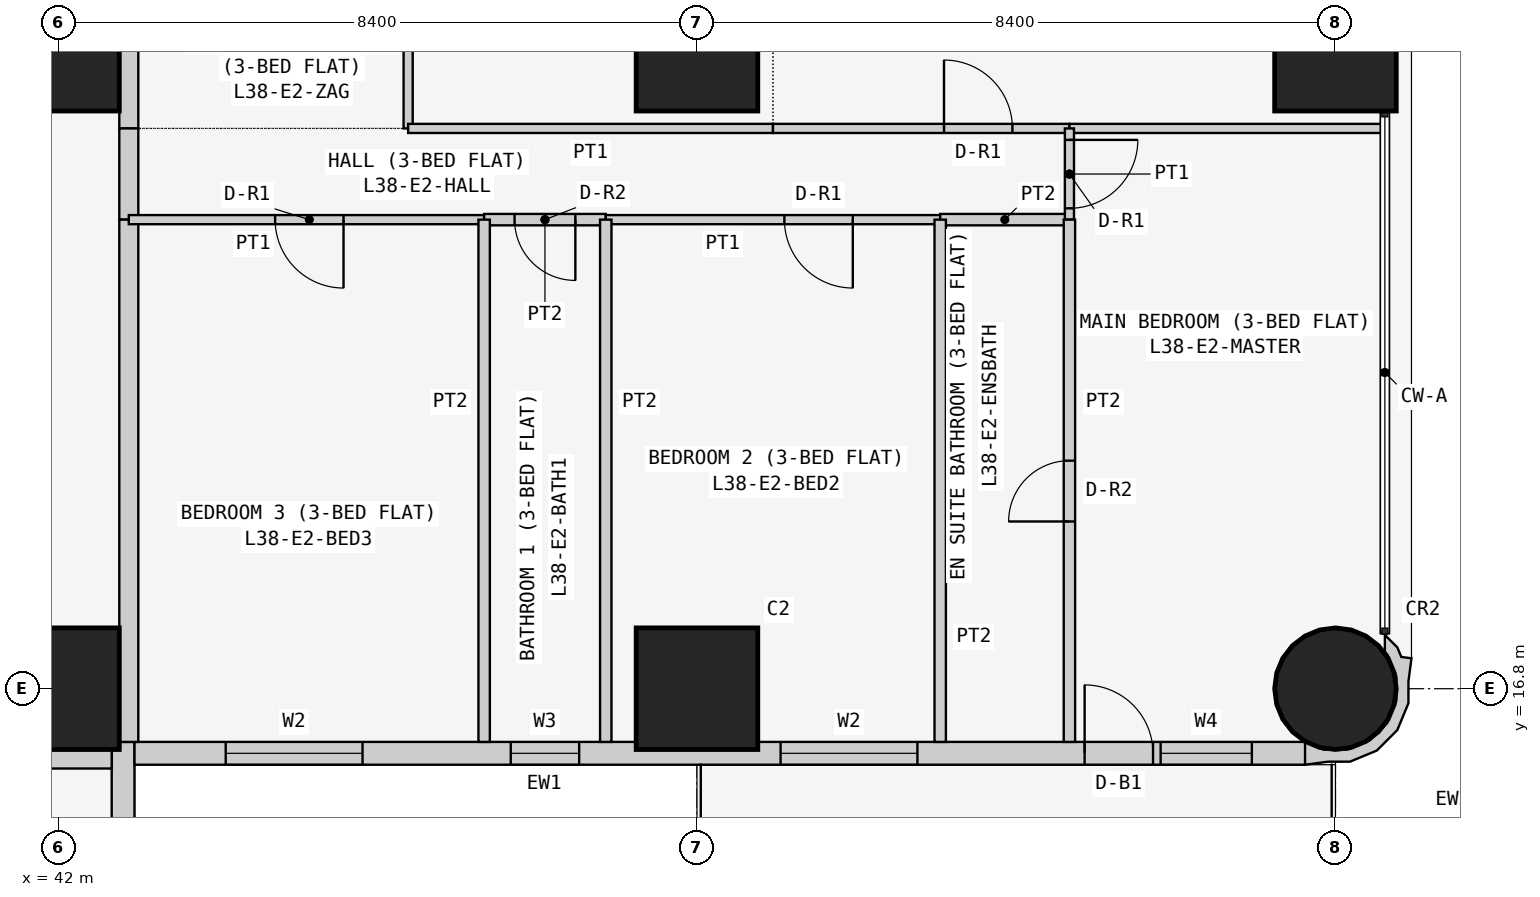
"""IFC4 building model, lengths in metres.
Left out: names, types, materials, properties, quantities, classifications, styles, units other than length and angle.
Written with IfcOpenShell. Run it as: python <this file> out.ifc"""

import sys

from ifc_helpers import new_model, si_unit, direction, frame, frame_2d, origin, origin_2d, place, context, subcontext, project, spatial, polyline, rectangle, circle, outline, extrude, element, fill, save


model = new_model("IFC4")
c1 = context("Model", 3, precision=1e-05, world=origin(), true_north=direction((0.0, 1.0)))
c2 = subcontext(c1, "Body", "Model", "MODEL_VIEW")
j1 = project(units=[si_unit("LENGTHUNIT", "METRE"), si_unit("PLANEANGLEUNIT", "RADIAN")], contexts=[c1])
p1 = place(None, origin())
s1 = spatial("IfcSite", under=j1, at=p1, CompositionType="ELEMENT")
p2 = place(p1, origin())
s2 = spatial("IfcBuilding", under=s1, at=p2, CompositionType="ELEMENT")
p3 = place(p2, frame((0.0, 0.0, 148.5)))
s3 = spatial("IfcBuildingStorey", under=s2, at=p3, CompositionType="ELEMENT", Elevation=148.5)
for number, where, z_axis, x_axis in (
    (1, (42.0, 16.8, 0.0), (0.0, 0.0, 1.0), (1.0, 0.0, 0.0)),
    (2, (42.0, 25.2, 0.0), (0.0, 0.0, 1.0), (1.0, 0.0, 0.0)),
    (3, (50.4, 16.8, 0.0), (0.0, 0.0, 1.0), (1.0, 0.0, 0.0)),
    (4, (50.4, 25.2, 0.0), (0.0, 0.0, 1.0), (1.0, 0.0, 0.0)),
):
    element("IfcColumn", number, at=place(p3, frame(where, z_axis=z_axis, x_axis=x_axis)), inside=s3, PredefinedType="COLUMN", context=c2, shape_type="SweptSolid", body=[
        extrude(rectangle(XDim=1.6, YDim=1.6, at=origin_2d()), origin(), (0.0, 0.0, 1.0), 3.6),
    ])
p4 = place(p3, frame((58.8, 16.8, 0.0), z_axis=(0.0, 0.0, 1.0), x_axis=(1.0, 0.0, 0.0)))
e5 = element("IfcColumn", 5, at=p4, inside=s3, PredefinedType="COLUMN", context=c2, shape_type="SweptSolid", body=[
    extrude(circle(Radius=0.8, at=origin_2d()), origin(), (0.0, 0.0, 1.0), 3.6),
])
p5 = place(p3, frame((58.8, 25.2, 0.0), z_axis=(0.0, 0.0, 1.0), x_axis=(1.0, 0.0, 0.0)))
e6 = element("IfcColumn", 6, at=p5, inside=s3, PredefinedType="COLUMN", context=c2, shape_type="SweptSolid", body=[
    extrude(rectangle(XDim=1.6, YDim=1.6, at=origin_2d()), origin(), (0.0, 0.0, 1.0), 3.6),
])
p6 = place(p3, frame((42.85, 8.8, 0.0), z_axis=(0.0, 0.0, 1.0), x_axis=(0.0, 1.0, 0.0)))
e7 = element("IfcWall", 7, at=p6, inside=s3, PredefinedType="SOLIDWALL", context=c2, shape_type="SweptSolid", body=[
    extrude(rectangle(XDim=7.3, YDim=0.3, at=frame_2d((3.65, 0.0))), origin(), (0.0, 0.0, 1.0), 3.45),
])
p7 = place(p6, frame((3.1, 0.0, 0.9)))
e8 = element("IfcOpeningElement", 8, at=p7, cuts=e7, PredefinedType="OPENING", context=c2, shape_type="SweptSolid", body=[
    extrude(rectangle(XDim=2.4, YDim=1.5, at=frame_2d((1.2, 0.75))), frame((0.0, 0.16, 0.0), z_axis=(0.0, -1.0, 0.0), x_axis=(1.0, 0.0, 0.0)), (0.0, 0.0, 1.0), 0.32),
])
p8 = place(p6, frame((0.75, 0.0, 0.9)))
e9 = element("IfcOpeningElement", 9, at=p8, cuts=e7, PredefinedType="OPENING", context=c2, shape_type="SweptSolid", body=[
    extrude(rectangle(XDim=1.2, YDim=1.5, at=frame_2d((0.6, 0.75))), frame((0.0, 0.16, 0.0), z_axis=(0.0, -1.0, 0.0), x_axis=(1.0, 0.0, 0.0)), (0.0, 0.0, 1.0), 0.32),
])
p9 = place(p3, frame((43.0, 15.95, 0.0), z_axis=(0.0, 0.0, 1.0), x_axis=(1.0, 0.0, 0.0)))
e10 = element("IfcWall", 10, at=p9, inside=s3, PredefinedType="SOLIDWALL", context=c2, shape_type="SweptSolid", body=[
    extrude(rectangle(XDim=15.4, YDim=0.3, at=frame_2d((7.7, 0.0))), origin(), (0.0, 0.0, 1.0), 3.45),
])
p10 = place(p9, frame((1.2, 0.0, 0.9)))
e11 = element("IfcOpeningElement", 11, at=p10, cuts=e10, PredefinedType="OPENING", context=c2, shape_type="SweptSolid", body=[
    extrude(rectangle(XDim=1.8, YDim=1.5, at=frame_2d((0.9, 0.75))), frame((0.0, 0.16, 0.0), z_axis=(0.0, -1.0, 0.0), x_axis=(1.0, 0.0, 0.0)), (0.0, 0.0, 1.0), 0.32),
])
p11 = place(p9, frame((4.95, 0.0, 1.5)))
e12 = element("IfcOpeningElement", 12, at=p11, cuts=e10, PredefinedType="OPENING", context=c2, shape_type="SweptSolid", body=[
    extrude(rectangle(XDim=0.9, YDim=0.7, at=frame_2d((0.45, 0.35))), frame((0.0, 0.16, 0.0), z_axis=(0.0, -1.0, 0.0), x_axis=(1.0, 0.0, 0.0)), (0.0, 0.0, 1.0), 0.32),
])
p12 = place(p9, frame((8.5, 0.0, 0.9)))
e13 = element("IfcOpeningElement", 13, at=p12, cuts=e10, PredefinedType="OPENING", context=c2, shape_type="SweptSolid", body=[
    extrude(rectangle(XDim=1.8, YDim=1.5, at=frame_2d((0.9, 0.75))), frame((0.0, 0.16, 0.0), z_axis=(0.0, -1.0, 0.0), x_axis=(1.0, 0.0, 0.0)), (0.0, 0.0, 1.0), 0.32),
])
p13 = place(p9, frame((12.5, 0.0, 0.0)))
e14 = element("IfcOpeningElement", 14, at=p13, cuts=e10, PredefinedType="OPENING", context=c2, shape_type="SweptSolid", body=[
    extrude(rectangle(XDim=0.9, YDim=2.4, at=frame_2d((0.45, 1.2))), frame((0.0, 0.16, 0.0), z_axis=(0.0, -1.0, 0.0), x_axis=(1.0, 0.0, 0.0)), (0.0, 0.0, 1.0), 0.32),
])
p14 = place(p9, frame((13.5, 0.0, 0.9)))
e15 = element("IfcOpeningElement", 15, at=p14, cuts=e10, PredefinedType="OPENING", context=c2, shape_type="SweptSolid", body=[
    extrude(rectangle(XDim=1.2, YDim=1.5, at=frame_2d((0.6, 0.75))), frame((0.0, 0.16, 0.0), z_axis=(0.0, -1.0, 0.0), x_axis=(1.0, 0.0, 0.0)), (0.0, 0.0, 1.0), 0.32),
])
p15 = place(p3, frame((58.473, 15.983, 0.0), z_axis=(0.0, 0.0, 1.0), x_axis=(0.93923434088, -0.343276641956, 0.0)))
e16 = element("IfcWall", 16, at=p15, inside=s3, PredefinedType="SOLIDWALL", context=c2, shape_type="SweptSolid", body=[
    extrude(outline(polyline([(0.828, 1.599), (0.697, 1.569), (0.604, 1.67), (0.394, 1.767), (0.471, 1.556), (0.508, 1.539), (0.724, 1.304), (0.834, 1.005), (0.82, 0.686), (0.686, 0.397), (0.451, 0.182), (0.152, 0.073), (-0.116, 0.084), (-0.127, 0.078), (-0.146, 0.071), (-0.006, -0.197), (0.266, -0.055), (0.535, 0.044), (0.817, 0.302), (0.978, 0.648), (0.994, 1.03), (0.895, 1.3), (0.828, 1.599)])), origin(), (0.0, 0.0, 1.0), 3.45),
])
p16 = place(p3, frame((42.925, 29.4, 0.0), z_axis=(0.0, 0.0, 1.0), x_axis=(0.0, -1.0, 0.0)))
e17 = element("IfcWall", 17, at=p16, inside=s3, PredefinedType="PARTITIONING", context=c2, shape_type="SweptSolid", body=[
    extrude(rectangle(XDim=5.229, YDim=0.25, at=frame_2d((2.615, 0.0))), origin(), (0.0, 0.0, 1.0), 3.45),
])
p17 = place(p16, frame((2.1, 0.0, 0.0)))
e18 = element("IfcOpeningElement", 18, at=p17, cuts=e17, PredefinedType="OPENING", context=c2, shape_type="SweptSolid", body=[
    extrude(rectangle(XDim=1.0, YDim=2.1, at=frame_2d((0.5, 1.05))), frame((0.0, 0.135, 0.0), z_axis=(0.0, -1.0, 0.0), x_axis=(1.0, 0.0, 0.0)), (0.0, 0.0, 1.0), 0.27),
])
p18 = place(p3, frame((42.925, 24.171, 0.0), z_axis=(0.0, 0.0, 1.0), x_axis=(0.0, -1.0, 0.0)))
e19 = element("IfcWall", 19, at=p18, inside=s3, PredefinedType="PARTITIONING", context=c2, shape_type="SweptSolid", body=[
    extrude(rectangle(XDim=1.2, YDim=0.25, at=frame_2d((0.6, 0.0))), origin(), (0.0, 0.0, 1.0), 3.45),
])
for number, where, z_axis, x_axis in (
    (20, (42.925, 22.971, 0.0), (0.0, 0.0, 1.0), (0.0, -1.0, 0.0)),
    (21, (42.7, 15.875, 0.0), (0.0, 0.0, 1.0), (-1.0, 0.0, 0.0)),
):
    element("IfcWall", number, at=place(p3, frame(where, z_axis=z_axis, x_axis=x_axis)), inside=s3, PredefinedType="PARTITIONING", context=c2, shape_type="SweptSolid", body=[
        extrude(rectangle(XDim=6.871, YDim=0.25, at=frame_2d((3.436, 0.0))), origin(), (0.0, 0.0, 1.0), 3.45),
    ])
p19 = place(p3, frame((46.6, 29.4, 0.0), z_axis=(0.0, 0.0, 1.0), x_axis=(0.0, -1.0, 0.0)))
e22 = element("IfcWall", 22, at=p19, inside=s3, PredefinedType="PARTITIONING", context=c2, shape_type="SweptSolid", body=[
    extrude(rectangle(XDim=5.229, YDim=0.12, at=frame_2d((2.615, 0.0))), origin(), (0.0, 0.0, 1.0), 3.45),
])
p20 = place(p19, frame((1.05, 0.0, 0.0)))
e23 = element("IfcOpeningElement", 23, at=p20, cuts=e22, PredefinedType="OPENING", context=c2, shape_type="SweptSolid", body=[
    extrude(rectangle(XDim=0.9, YDim=2.1, at=frame_2d((0.45, 1.05))), frame((0.0, 0.07, 0.0), z_axis=(0.0, -1.0, 0.0), x_axis=(1.0, 0.0, 0.0)), (0.0, 0.0, 1.0), 0.14),
])
p21 = place(p3, frame((51.4, 24.171, 0.0), z_axis=(0.0, 0.0, 1.0), x_axis=(-1.0, 0.0, 0.0)))
e24 = element("IfcWall", 24, at=p21, inside=s3, PredefinedType="PARTITIONING", context=c2, shape_type="SweptSolid", body=[
    extrude(rectangle(XDim=4.8, YDim=0.12, at=frame_2d((2.4, 0.0))), origin(), (0.0, 0.0, 1.0), 3.45),
])
p22 = place(p3, frame((55.3, 24.171, 0.0), z_axis=(0.0, 0.0, 1.0), x_axis=(-1.0, 0.0, 0.0)))
e25 = element("IfcWall", 25, at=p22, inside=s3, PredefinedType="PARTITIONING", context=c2, shape_type="SweptSolid", body=[
    extrude(rectangle(XDim=3.9, YDim=0.12, at=frame_2d((1.95, 0.0))), origin(), (0.0, 0.0, 1.0), 3.45),
])
p23 = place(p22, frame((0.75, 0.0, 0.0)))
e26 = element("IfcOpeningElement", 26, at=p23, cuts=e25, PredefinedType="OPENING", context=c2, shape_type="SweptSolid", body=[
    extrude(rectangle(XDim=0.9, YDim=2.1, at=frame_2d((0.45, 1.05))), frame((0.0, 0.07, 0.0), z_axis=(0.0, -1.0, 0.0), x_axis=(1.0, 0.0, 0.0)), (0.0, 0.0, 1.0), 0.14),
])
p24 = place(p3, frame((59.45, 24.171, 0.0), z_axis=(0.0, 0.0, 1.0), x_axis=(-1.0, 0.0, 0.0)))
e27 = element("IfcWall", 27, at=p24, inside=s3, PredefinedType="PARTITIONING", context=c2, shape_type="SweptSolid", body=[
    extrude(rectangle(XDim=4.15, YDim=0.12, at=frame_2d((2.075, 0.0))), origin(), (0.0, 0.0, 1.0), 3.45),
])
p25 = place(p3, frame((47.6, 22.971, 0.0), z_axis=(0.0, 0.0, 1.0), x_axis=(-1.0, 0.0, 0.0)))
e28 = element("IfcWall", 28, at=p25, inside=s3, PredefinedType="PARTITIONING", context=c2, shape_type="SweptSolid", body=[
    extrude(rectangle(XDim=4.675, YDim=0.12, at=frame_2d((2.337, 0.0))), origin(), (0.0, 0.0, 1.0), 3.45),
])
p26 = place(p25, frame((1.85, 0.0, 0.0)))
e29 = element("IfcOpeningElement", 29, at=p26, cuts=e28, PredefinedType="OPENING", context=c2, shape_type="SweptSolid", body=[
    extrude(rectangle(XDim=0.9, YDim=2.1, at=frame_2d((0.45, 1.05))), frame((0.0, 0.07, 0.0), z_axis=(0.0, -1.0, 0.0), x_axis=(1.0, 0.0, 0.0)), (0.0, 0.0, 1.0), 0.14),
])
p27 = place(p3, frame((49.2, 22.971, 0.0), z_axis=(0.0, 0.0, 1.0), x_axis=(-1.0, 0.0, 0.0)))
e30 = element("IfcWall", 30, at=p27, inside=s3, PredefinedType="PARTITIONING", context=c2, shape_type="SweptSolid", body=[
    extrude(rectangle(XDim=1.6, YDim=0.15, at=frame_2d((0.8, 0.0))), origin(), (0.0, 0.0, 1.0), 3.45),
])
p28 = place(p27, frame((0.4, 0.0, 0.0)))
e31 = element("IfcOpeningElement", 31, at=p28, cuts=e30, PredefinedType="OPENING", context=c2, shape_type="SweptSolid", body=[
    extrude(rectangle(XDim=0.8, YDim=2.1, at=frame_2d((0.4, 1.05))), frame((0.0, 0.085, 0.0), z_axis=(0.0, -1.0, 0.0), x_axis=(1.0, 0.0, 0.0)), (0.0, 0.0, 1.0), 0.17),
])
p29 = place(p3, frame((53.6, 22.971, 0.0), z_axis=(0.0, 0.0, 1.0), x_axis=(-1.0, 0.0, 0.0)))
e32 = element("IfcWall", 32, at=p29, inside=s3, PredefinedType="PARTITIONING", context=c2, shape_type="SweptSolid", body=[
    extrude(rectangle(XDim=4.4, YDim=0.12, at=frame_2d((2.2, 0.0))), origin(), (0.0, 0.0, 1.0), 3.45),
])
p30 = place(p29, frame((1.15, 0.0, 0.0)))
e33 = element("IfcOpeningElement", 33, at=p30, cuts=e32, PredefinedType="OPENING", context=c2, shape_type="SweptSolid", body=[
    extrude(rectangle(XDim=0.9, YDim=2.1, at=frame_2d((0.45, 1.05))), frame((0.0, 0.07, 0.0), z_axis=(0.0, -1.0, 0.0), x_axis=(1.0, 0.0, 0.0)), (0.0, 0.0, 1.0), 0.14),
])
p31 = place(p3, frame((55.3, 22.971, 0.0), z_axis=(0.0, 0.0, 1.0), x_axis=(-1.0, 0.0, 0.0)))
e34 = element("IfcWall", 34, at=p31, inside=s3, PredefinedType="PARTITIONING", context=c2, shape_type="SweptSolid", body=[
    extrude(rectangle(XDim=1.7, YDim=0.15, at=frame_2d((0.85, 0.0))), origin(), (0.0, 0.0, 1.0), 3.45),
])
p32 = place(p3, frame((55.3, 24.171, 0.0), z_axis=(0.0, 0.0, 1.0), x_axis=(0.0, -1.0, 0.0)))
e35 = element("IfcWall", 35, at=p32, inside=s3, PredefinedType="PARTITIONING", context=c2, shape_type="SweptSolid", body=[
    extrude(rectangle(XDim=1.2, YDim=0.12, at=frame_2d((0.6, 0.0))), origin(), (0.0, 0.0, 1.0), 3.45),
])
p33 = place(p32, frame((0.151, 0.0, 0.0)))
e36 = element("IfcOpeningElement", 36, at=p33, cuts=e35, PredefinedType="OPENING", context=c2, shape_type="SweptSolid", body=[
    extrude(rectangle(XDim=0.9, YDim=2.1, at=frame_2d((0.45, 1.05))), frame((0.0, 0.07, 0.0), z_axis=(0.0, -1.0, 0.0), x_axis=(1.0, 0.0, 0.0)), (0.0, 0.0, 1.0), 0.14),
])
for number, where, z_axis, x_axis in (
    (37, (47.6, 22.971, 0.0), (0.0, 0.0, 1.0), (0.0, -1.0, 0.0)),
    (38, (49.2, 22.971, 0.0), (0.0, 0.0, 1.0), (0.0, -1.0, 0.0)),
    (39, (53.6, 22.971, 0.0), (0.0, 0.0, 1.0), (0.0, -1.0, 0.0)),
):
    element("IfcWall", number, at=place(p3, frame(where, z_axis=z_axis, x_axis=x_axis)), inside=s3, PredefinedType="PARTITIONING", context=c2, shape_type="SweptSolid", body=[
        extrude(rectangle(XDim=6.871, YDim=0.15, at=frame_2d((3.436, 0.0))), origin(), (0.0, 0.0, 1.0), 3.45),
    ])
p34 = place(p3, frame((55.3, 22.971, 0.0), z_axis=(0.0, 0.0, 1.0), x_axis=(0.0, -1.0, 0.0)))
e40 = element("IfcWall", 40, at=p34, inside=s3, PredefinedType="PARTITIONING", context=c2, shape_type="SweptSolid", body=[
    extrude(rectangle(XDim=6.871, YDim=0.15, at=frame_2d((3.436, 0.0))), origin(), (0.0, 0.0, 1.0), 3.45),
])
p35 = place(p34, frame((3.171, 0.0, 0.0)))
e41 = element("IfcOpeningElement", 41, at=p35, cuts=e40, PredefinedType="OPENING", context=c2, shape_type="SweptSolid", body=[
    extrude(rectangle(XDim=0.8, YDim=2.1, at=frame_2d((0.4, 1.05))), frame((0.0, 0.085, 0.0), z_axis=(0.0, -1.0, 0.0), x_axis=(1.0, 0.0, 0.0)), (0.0, 0.0, 1.0), 0.17),
])
p36 = place(p10, origin())
e42 = element("IfcWindow", 42, at=p36, inside=s3, PartitioningType="SINGLE_PANEL", PredefinedType="WINDOW", context=c2, shape_type="SweptSolid", body=[
    extrude(rectangle(XDim=1.8, YDim=1.5, at=frame_2d((0.9, 0.75))), frame((0.0, 0.03, 0.0), z_axis=(0.0, -1.0, 0.0), x_axis=(1.0, 0.0, 0.0)), (0.0, 0.0, 1.0), 0.06),
])
fill(e11, e42)
p37 = place(p11, origin())
e43 = element("IfcWindow", 43, at=p37, inside=s3, PartitioningType="SINGLE_PANEL", PredefinedType="WINDOW", context=c2, shape_type="SweptSolid", body=[
    extrude(rectangle(XDim=0.9, YDim=0.7, at=frame_2d((0.45, 0.35))), frame((0.0, 0.03, 0.0), z_axis=(0.0, -1.0, 0.0), x_axis=(1.0, 0.0, 0.0)), (0.0, 0.0, 1.0), 0.06),
])
fill(e12, e43)
p38 = place(p12, origin())
e44 = element("IfcWindow", 44, at=p38, inside=s3, PartitioningType="SINGLE_PANEL", PredefinedType="WINDOW", context=c2, shape_type="SweptSolid", body=[
    extrude(rectangle(XDim=1.8, YDim=1.5, at=frame_2d((0.9, 0.75))), frame((0.0, 0.03, 0.0), z_axis=(0.0, -1.0, 0.0), x_axis=(1.0, 0.0, 0.0)), (0.0, 0.0, 1.0), 0.06),
])
fill(e13, e44)
p39 = place(p13, origin())
e45 = element("IfcDoor", 45, at=p39, inside=s3, OperationType="SINGLE_SWING_LEFT", PredefinedType="DOOR", context=c2, shape_type="SweptSolid", body=[
    extrude(rectangle(XDim=0.9, YDim=2.4, at=frame_2d((0.45, 1.2))), frame((0.0, 0.025, 0.0), z_axis=(0.0, -1.0, 0.0), x_axis=(1.0, 0.0, 0.0)), (0.0, 0.0, 1.0), 0.05),
])
fill(e14, e45)
p40 = place(p14, origin())
e46 = element("IfcWindow", 46, at=p40, inside=s3, PartitioningType="SINGLE_PANEL", PredefinedType="WINDOW", context=c2, shape_type="SweptSolid", body=[
    extrude(rectangle(XDim=1.2, YDim=1.5, at=frame_2d((0.6, 0.75))), frame((0.0, 0.03, 0.0), z_axis=(0.0, -1.0, 0.0), x_axis=(1.0, 0.0, 0.0)), (0.0, 0.0, 1.0), 0.06),
])
fill(e15, e46)
p41 = place(p23, frame((0.9, 0.0, 0.0), z_axis=(0.0, 0.0, 1.0), x_axis=(-1.0, 0.0, 0.0)))
e47 = element("IfcDoor", 47, at=p41, inside=s3, OperationType="SINGLE_SWING_LEFT", PredefinedType="DOOR", context=c2, shape_type="SweptSolid", body=[
    extrude(rectangle(XDim=0.9, YDim=2.1, at=frame_2d((0.45, 1.05))), frame((0.0, 0.025, 0.0), z_axis=(0.0, -1.0, 0.0), x_axis=(1.0, 0.0, 0.0)), (0.0, 0.0, 1.0), 0.05),
])
fill(e26, e47)
p42 = place(p26, origin())
e48 = element("IfcDoor", 48, at=p42, inside=s3, OperationType="SINGLE_SWING_LEFT", PredefinedType="DOOR", context=c2, shape_type="SweptSolid", body=[
    extrude(rectangle(XDim=0.9, YDim=2.1, at=frame_2d((0.45, 1.05))), frame((0.0, 0.025, 0.0), z_axis=(0.0, -1.0, 0.0), x_axis=(1.0, 0.0, 0.0)), (0.0, 0.0, 1.0), 0.05),
])
fill(e29, e48)
p43 = place(p28, origin())
e49 = element("IfcDoor", 49, at=p43, inside=s3, OperationType="SINGLE_SWING_LEFT", PredefinedType="DOOR", context=c2, shape_type="SweptSolid", body=[
    extrude(rectangle(XDim=0.8, YDim=2.1, at=frame_2d((0.4, 1.05))), frame((0.0, 0.025, 0.0), z_axis=(0.0, -1.0, 0.0), x_axis=(1.0, 0.0, 0.0)), (0.0, 0.0, 1.0), 0.05),
])
fill(e31, e49)
p44 = place(p30, origin())
e50 = element("IfcDoor", 50, at=p44, inside=s3, OperationType="SINGLE_SWING_LEFT", PredefinedType="DOOR", context=c2, shape_type="SweptSolid", body=[
    extrude(rectangle(XDim=0.9, YDim=2.1, at=frame_2d((0.45, 1.05))), frame((0.0, 0.025, 0.0), z_axis=(0.0, -1.0, 0.0), x_axis=(1.0, 0.0, 0.0)), (0.0, 0.0, 1.0), 0.05),
])
fill(e33, e50)
p45 = place(p33, origin())
e51 = element("IfcDoor", 51, at=p45, inside=s3, OperationType="SINGLE_SWING_LEFT", PredefinedType="DOOR", context=c2, shape_type="SweptSolid", body=[
    extrude(rectangle(XDim=0.9, YDim=2.1, at=frame_2d((0.45, 1.05))), frame((0.0, 0.025, 0.0), z_axis=(0.0, -1.0, 0.0), x_axis=(1.0, 0.0, 0.0)), (0.0, 0.0, 1.0), 0.05),
])
fill(e36, e51)
p46 = place(p35, frame((0.8, 0.0, 0.0), z_axis=(0.0, 0.0, 1.0), x_axis=(-1.0, 0.0, 0.0)))
e52 = element("IfcDoor", 52, at=p46, inside=s3, OperationType="SINGLE_SWING_LEFT", PredefinedType="DOOR", context=c2, shape_type="SweptSolid", body=[
    extrude(rectangle(XDim=0.8, YDim=2.1, at=frame_2d((0.4, 1.05))), frame((0.0, 0.025, 0.0), z_axis=(0.0, -1.0, 0.0), x_axis=(1.0, 0.0, 0.0)), (0.0, 0.0, 1.0), 0.05),
])
fill(e41, e52)
save(model, sys.argv[1])
